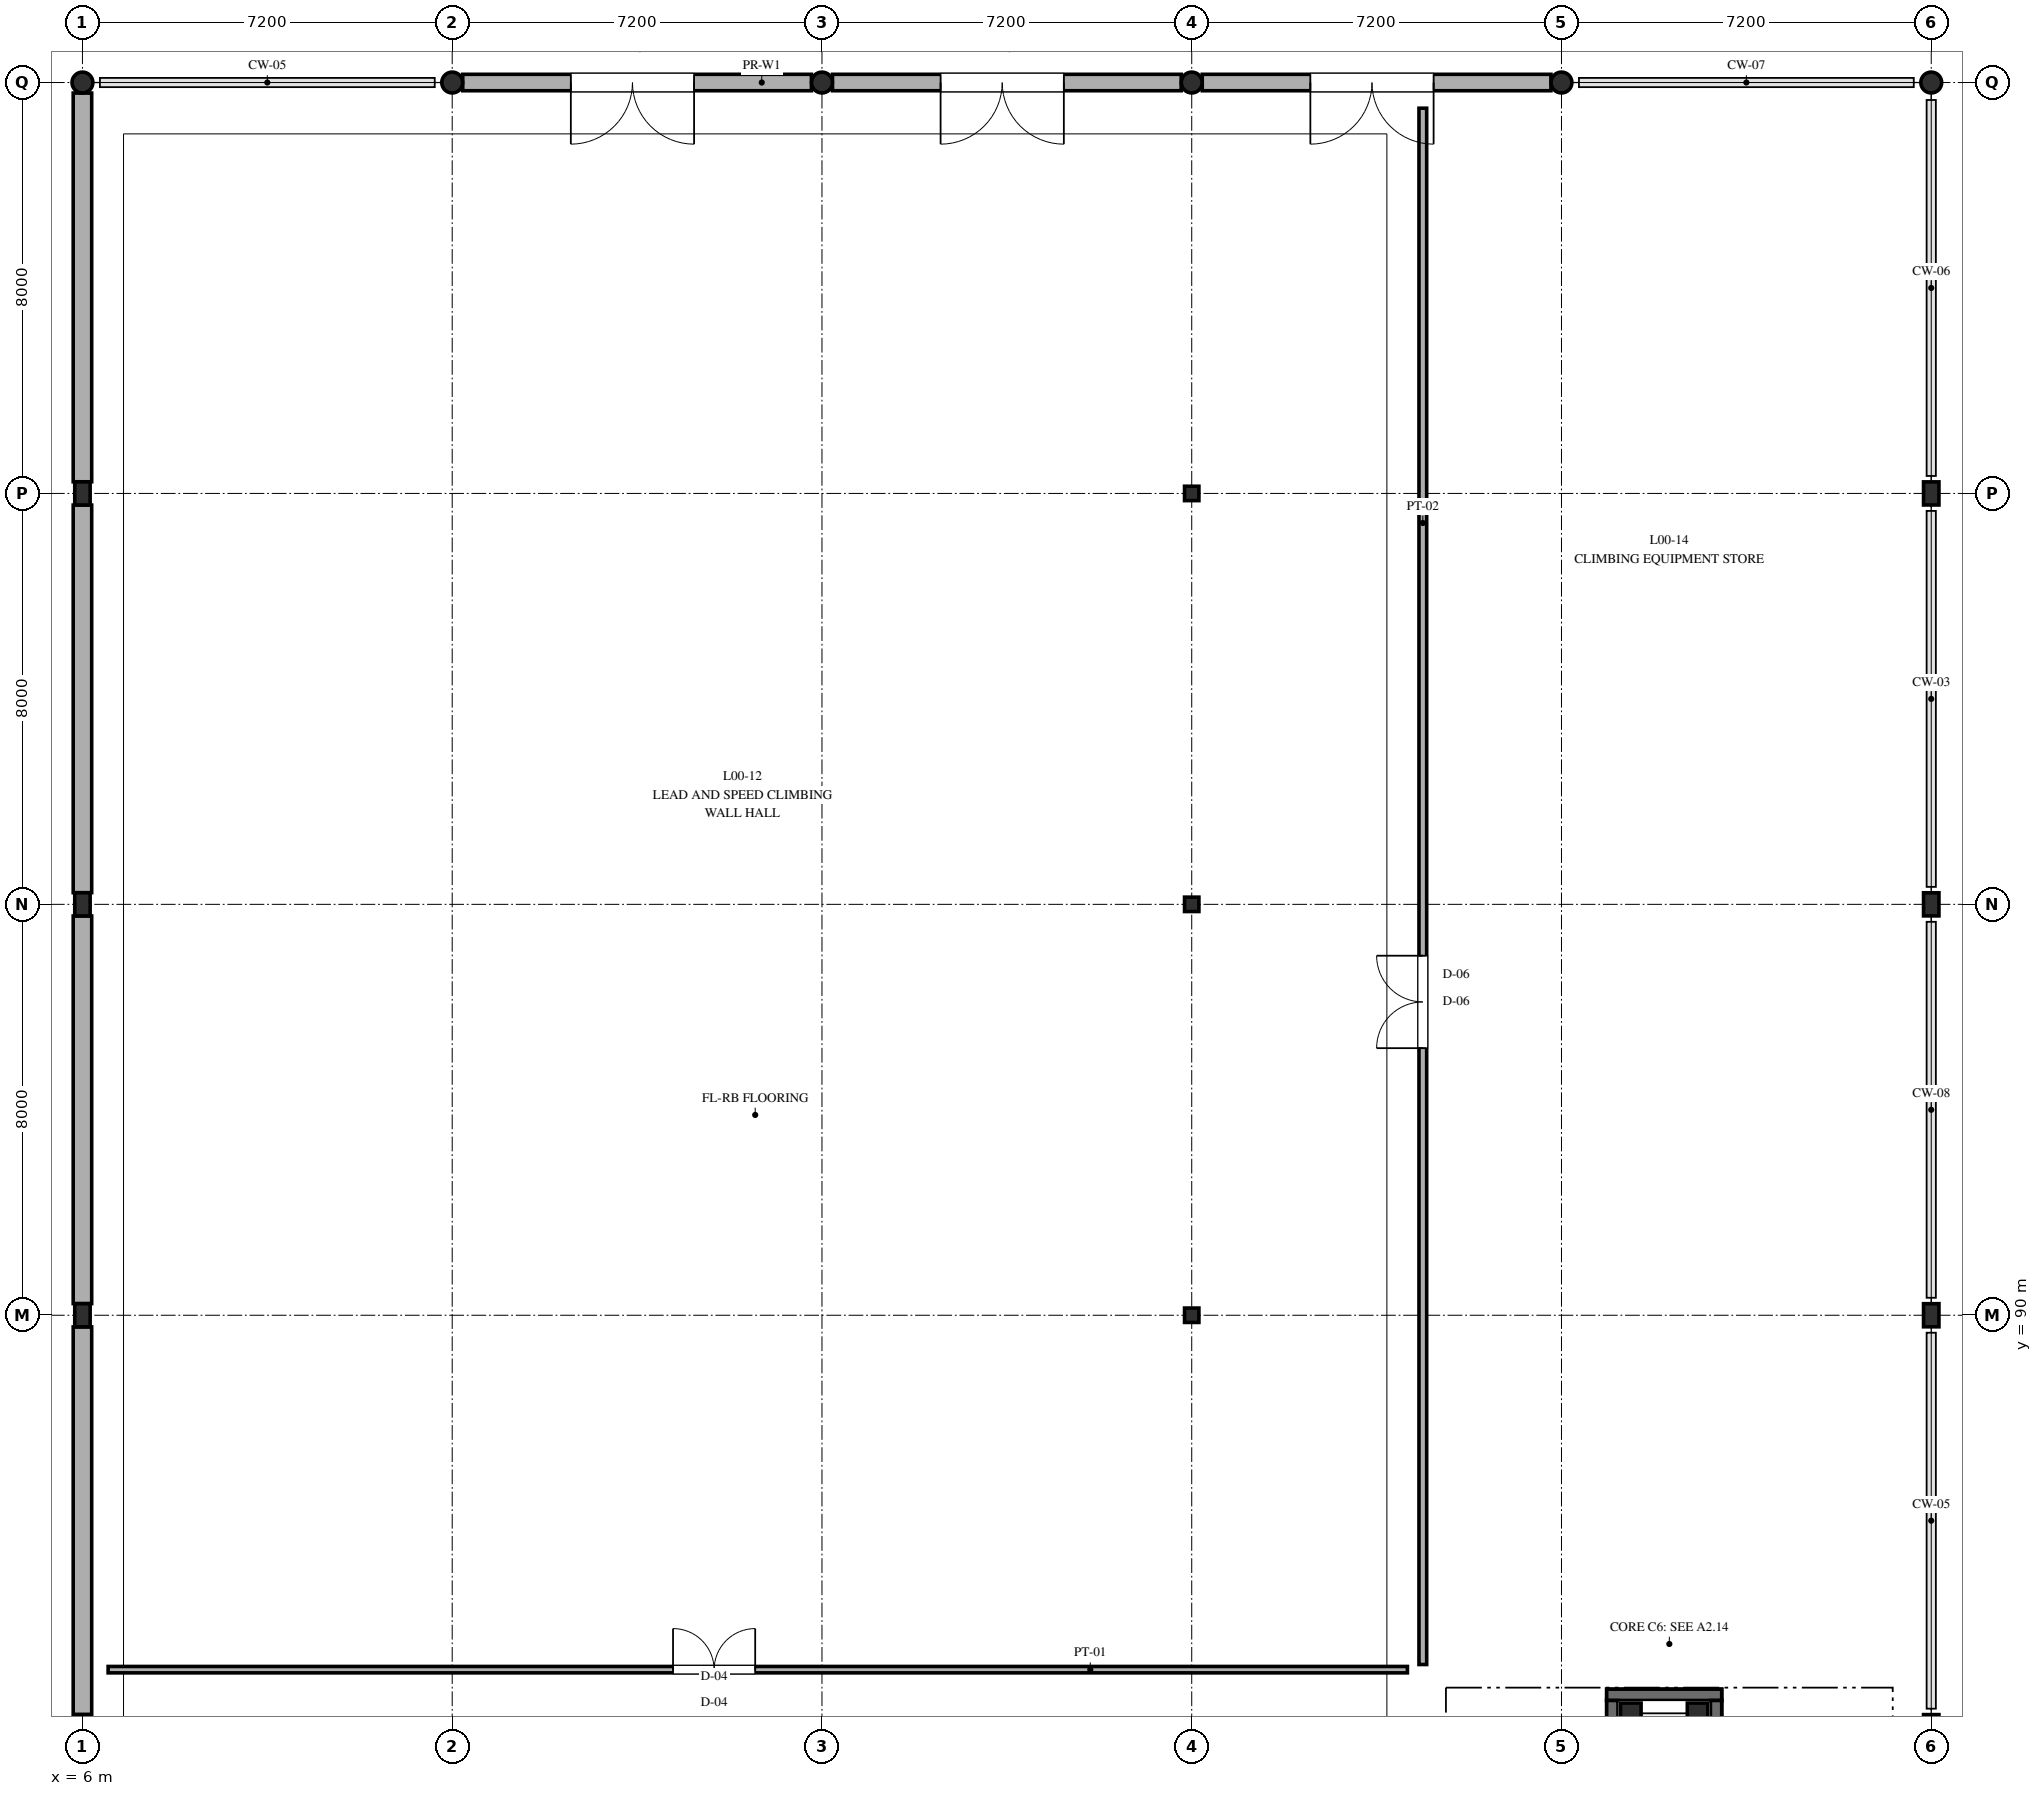
"""IFC4 building model, lengths in metres.
Left out: names, types, materials, properties, quantities, classifications, styles, units other than length and angle.
Written with IfcOpenShell. Run it as: python <this file> out.ifc"""

import sys

from ifc_helpers import new_model, si_unit, direction, frame, frame_2d, origin, origin_2d, place, context, subcontext, project, spatial, rectangle, hollow_circle, i_section, extrude, element, fill, save


model = new_model("IFC4")
c1 = context("Model", 3, precision=1e-05, world=origin(), true_north=direction((0.0, 1.0)))
c2 = subcontext(c1, "Body", "Model", "MODEL_VIEW")
j1 = project(units=[si_unit("LENGTHUNIT", "METRE"), si_unit("PLANEANGLEUNIT", "RADIAN")], contexts=[c1])
p1 = place(None, origin())
s1 = spatial("IfcSite", under=j1, at=p1, CompositionType="ELEMENT")
p2 = place(p1, origin())
s2 = spatial("IfcBuilding", under=s1, at=p2, CompositionType="ELEMENT")
p3 = place(p2, origin())
s3 = spatial("IfcBuildingStorey", under=s2, at=p3, CompositionType="ELEMENT", Elevation=0.0)
for number, where, z_axis, x_axis in (
    (1, (37.45, 82.25, -2.15), (0.0, 0.0, 1.0), (1.0, 0.0, 0.0)),
    (2, (36.15, 82.25, -2.15), (0.0, 0.0, 1.0), (1.0, 0.0, 0.0)),
):
    element("IfcColumn", number, at=place(p3, frame(where, z_axis=z_axis, x_axis=x_axis)), inside=s3, PredefinedType="COLUMN", context=c2, shape_type="SweptSolid", body=[
        extrude(rectangle(XDim=0.4, YDim=0.4, at=origin_2d()), origin(), (0.0, 0.0, 1.0), 0.5),
    ])
for number, where, z_axis, x_axis in (
    (3, (6.0, 114.0, 0.0), (0.0, 0.0, 1.0), (1.0, 0.0, 0.0)),
    (4, (13.2, 114.0, 0.0), (0.0, 0.0, 1.0), (1.0, 0.0, 0.0)),
    (5, (20.4, 114.0, 0.0), (0.0, 0.0, 1.0), (1.0, 0.0, 0.0)),
    (6, (27.6, 114.0, 0.0), (0.0, 0.0, 1.0), (1.0, 0.0, 0.0)),
    (7, (34.8, 114.0, 0.0), (0.0, 0.0, 1.0), (1.0, 0.0, 0.0)),
    (8, (42.0, 114.0, 0.0), (0.0, 0.0, 1.0), (1.0, 0.0, 0.0)),
):
    element("IfcColumn", number, at=place(p3, frame(where, z_axis=z_axis, x_axis=x_axis)), inside=s3, PredefinedType="COLUMN", context=c2, shape_type="SweptSolid", body=[
        extrude(hollow_circle(Radius=0.203, WallThickness=0.016, at=origin_2d()), origin(), (0.0, 0.0, 1.0), 4.8),
    ])
for number, where, z_axis, x_axis in (
    (9, (6.0, 82.0, 0.0), (0.0, 0.0, 1.0), (1.0, 0.0, 0.0)),
    (10, (42.0, 82.0, 0.0), (0.0, 0.0, 1.0), (1.0, 0.0, 0.0)),
    (11, (6.0, 90.0, 0.0), (0.0, 0.0, 1.0), (1.0, 0.0, 0.0)),
    (12, (42.0, 90.0, 0.0), (0.0, 0.0, 1.0), (1.0, 0.0, 0.0)),
):
    element("IfcColumn", number, at=place(p3, frame(where, z_axis=z_axis, x_axis=x_axis)), inside=s3, PredefinedType="COLUMN", context=c2, shape_type="SweptSolid", body=[
        extrude(i_section(OverallWidth=0.3, OverallDepth=0.45, WebThickness=0.014, FlangeThickness=0.026, FilletRadius=0.027, at=origin_2d()), origin(), (0.0, 0.0, 1.0), 4.8),
    ])
p4 = place(p3, frame((27.6, 90.0, 0.0), z_axis=(0.0, 0.0, 1.0), x_axis=(1.0, 0.0, 0.0)))
e13 = element("IfcColumn", 13, at=p4, inside=s3, PredefinedType="COLUMN", context=c2, shape_type="SweptSolid", body=[
    extrude(i_section(OverallWidth=0.28, OverallDepth=0.28, WebThickness=0.01, FlangeThickness=0.018, FilletRadius=0.024, at=origin_2d()), origin(), (0.0, 0.0, 1.0), 4.8),
])
for number, where, z_axis, x_axis in (
    (14, (6.0, 98.0, 0.0), (0.0, 0.0, 1.0), (1.0, 0.0, 0.0)),
    (15, (42.0, 98.0, 0.0), (0.0, 0.0, 1.0), (1.0, 0.0, 0.0)),
):
    element("IfcColumn", number, at=place(p3, frame(where, z_axis=z_axis, x_axis=x_axis)), inside=s3, PredefinedType="COLUMN", context=c2, shape_type="SweptSolid", body=[
        extrude(i_section(OverallWidth=0.3, OverallDepth=0.45, WebThickness=0.014, FlangeThickness=0.026, FilletRadius=0.027, at=origin_2d()), origin(), (0.0, 0.0, 1.0), 4.8),
    ])
p5 = place(p3, frame((27.6, 98.0, 0.0), z_axis=(0.0, 0.0, 1.0), x_axis=(1.0, 0.0, 0.0)))
e16 = element("IfcColumn", 16, at=p5, inside=s3, PredefinedType="COLUMN", context=c2, shape_type="SweptSolid", body=[
    extrude(i_section(OverallWidth=0.28, OverallDepth=0.28, WebThickness=0.01, FlangeThickness=0.018, FilletRadius=0.024, at=origin_2d()), origin(), (0.0, 0.0, 1.0), 4.8),
])
for number, where, z_axis, x_axis in (
    (17, (6.0, 106.0, 0.0), (0.0, 0.0, 1.0), (1.0, 0.0, 0.0)),
    (18, (42.0, 106.0, 0.0), (0.0, 0.0, 1.0), (1.0, 0.0, 0.0)),
):
    element("IfcColumn", number, at=place(p3, frame(where, z_axis=z_axis, x_axis=x_axis)), inside=s3, PredefinedType="COLUMN", context=c2, shape_type="SweptSolid", body=[
        extrude(i_section(OverallWidth=0.3, OverallDepth=0.45, WebThickness=0.014, FlangeThickness=0.026, FilletRadius=0.027, at=origin_2d()), origin(), (0.0, 0.0, 1.0), 4.8),
    ])
p6 = place(p3, frame((27.6, 106.0, 0.0), z_axis=(0.0, 0.0, 1.0), x_axis=(1.0, 0.0, 0.0)))
e19 = element("IfcColumn", 19, at=p6, inside=s3, PredefinedType="COLUMN", context=c2, shape_type="SweptSolid", body=[
    extrude(i_section(OverallWidth=0.28, OverallDepth=0.28, WebThickness=0.01, FlangeThickness=0.018, FilletRadius=0.024, at=origin_2d()), origin(), (0.0, 0.0, 1.0), 4.8),
])
p7 = place(p3, frame((20.195, 114.0, 0.0), z_axis=(0.0, 0.0, 1.0), x_axis=(-1.0, 0.0, 0.0)))
e20 = element("IfcWall", 20, at=p7, inside=s3, PredefinedType="STANDARD", context=c2, shape_type="SweptSolid", body=[
    extrude(rectangle(XDim=6.79, YDim=0.32, at=frame_2d((3.395, 0.0))), origin(), (0.0, 0.0, 1.0), 4.48),
])
p8 = place(p7, frame((2.285, 0.0, 0.0)))
e21 = element("IfcOpeningElement", 21, at=p8, cuts=e20, PredefinedType="OPENING", context=c2, shape_type="SweptSolid", body=[
    extrude(rectangle(XDim=2.4, YDim=2.4, at=frame_2d((1.2, 1.2))), frame((0.0, 0.17, 0.0), z_axis=(0.0, -1.0, 0.0), x_axis=(1.0, 0.0, 0.0)), (0.0, 0.0, 1.0), 0.34),
])
p9 = place(p3, frame((27.395, 114.0, 0.0), z_axis=(0.0, 0.0, 1.0), x_axis=(-1.0, 0.0, 0.0)))
e22 = element("IfcWall", 22, at=p9, inside=s3, PredefinedType="STANDARD", context=c2, shape_type="SweptSolid", body=[
    extrude(rectangle(XDim=6.79, YDim=0.32, at=frame_2d((3.395, 0.0))), origin(), (0.0, 0.0, 1.0), 4.26),
])
p10 = place(p9, frame((2.285, 0.0, 0.0)))
e23 = element("IfcOpeningElement", 23, at=p10, cuts=e22, PredefinedType="OPENING", context=c2, shape_type="SweptSolid", body=[
    extrude(rectangle(XDim=2.4, YDim=2.4, at=frame_2d((1.2, 1.2))), frame((0.0, 0.17, 0.0), z_axis=(0.0, -1.0, 0.0), x_axis=(1.0, 0.0, 0.0)), (0.0, 0.0, 1.0), 0.34),
])
p11 = place(p3, frame((34.595, 114.0, 0.0), z_axis=(0.0, 0.0, 1.0), x_axis=(-1.0, 0.0, 0.0)))
e24 = element("IfcWall", 24, at=p11, inside=s3, PredefinedType="STANDARD", context=c2, shape_type="SweptSolid", body=[
    extrude(rectangle(XDim=6.79, YDim=0.32, at=frame_2d((3.395, 0.0))), origin(), (0.0, 0.0, 1.0), 4.26),
])
p12 = place(p11, frame((2.285, 0.0, 0.0)))
e25 = element("IfcOpeningElement", 25, at=p12, cuts=e24, PredefinedType="OPENING", context=c2, shape_type="SweptSolid", body=[
    extrude(rectangle(XDim=2.4, YDim=2.4, at=frame_2d((1.2, 1.2))), frame((0.0, 0.17, 0.0), z_axis=(0.0, -1.0, 0.0), x_axis=(1.0, 0.0, 0.0)), (0.0, 0.0, 1.0), 0.34),
])
for number, where, z_axis, x_axis in (
    (26, (6.0, 89.773, 0.0), (0.0, 0.0, 1.0), (0.0, -1.0, 0.0)),
    (27, (6.0, 97.773, 0.0), (0.0, 0.0, 1.0), (0.0, -1.0, 0.0)),
    (28, (6.0, 105.773, 0.0), (0.0, 0.0, 1.0), (0.0, -1.0, 0.0)),
):
    element("IfcWall", number, at=place(p3, frame(where, z_axis=z_axis, x_axis=x_axis)), inside=s3, PredefinedType="STANDARD", context=c2, shape_type="SweptSolid", body=[
        extrude(rectangle(XDim=7.546, YDim=0.36, at=frame_2d((3.773, 0.0))), origin(), (0.0, 0.0, 1.0), 4.8),
    ])
p13 = place(p3, frame((6.0, 113.795, 0.0), z_axis=(0.0, 0.0, 1.0), x_axis=(0.0, -1.0, 0.0)))
e29 = element("IfcWall", 29, at=p13, inside=s3, PredefinedType="STANDARD", context=c2, shape_type="SweptSolid", body=[
    extrude(rectangle(XDim=7.568, YDim=0.36, at=frame_2d((3.784, 0.0))), origin(), (0.0, 0.0, 1.0), 4.8),
])
p14 = place(p3, frame((37.92, 82.61, -2.15), z_axis=(0.0, 0.0, 1.0), x_axis=(-1.0, 0.0, 0.0)))
e30 = element("IfcWall", 30, at=p14, inside=s3, PredefinedType="SHEAR", context=c2, shape_type="SweptSolid", body=[
    extrude(rectangle(XDim=2.24, YDim=0.22, at=frame_2d((1.12, 0.0))), origin(), (0.0, 0.0, 1.0), 2.15),
])
for number, where, z_axis, x_axis in (
    (31, (35.79, 82.5, -2.15), (0.0, 0.0, 1.0), (0.0, -1.0, 0.0)),
    (32, (37.81, 79.9, -2.15), (0.0, 0.0, 1.0), (0.0, 1.0, 0.0)),
):
    element("IfcWall", number, at=place(p3, frame(where, z_axis=z_axis, x_axis=x_axis)), inside=s3, PredefinedType="SHEAR", context=c2, shape_type="SweptSolid", body=[
        extrude(rectangle(XDim=2.6, YDim=0.22, at=frame_2d((1.3, 0.0))), origin(), (0.0, 0.0, 1.0), 2.15),
    ])
p15 = place(p3, frame((37.92, 82.61, 0.0), z_axis=(0.0, 0.0, 1.0), x_axis=(-1.0, 0.0, 0.0)))
e33 = element("IfcWall", 33, at=p15, inside=s3, PredefinedType="SHEAR", context=c2, shape_type="SweptSolid", body=[
    extrude(rectangle(XDim=2.24, YDim=0.22, at=frame_2d((1.12, 0.0))), origin(), (0.0, 0.0, 1.0), 4.8),
])
p16 = place(p3, frame((35.79, 82.5, 0.0), z_axis=(0.0, 0.0, 1.0), x_axis=(0.0, -1.0, 0.0)))
e34 = element("IfcWall", 34, at=p16, inside=s3, PredefinedType="SHEAR", context=c2, shape_type="SweptSolid", body=[
    extrude(rectangle(XDim=2.6, YDim=0.22, at=frame_2d((1.3, 0.0))), origin(), (0.0, 0.0, 1.0), 4.8),
])
p17 = place(p16, frame((0.85, 0.0, 0.0)))
e35 = element("IfcOpeningElement", 35, at=p17, cuts=e34, PredefinedType="OPENING", context=c2, shape_type="SweptSolid", body=[
    extrude(rectangle(XDim=0.9, YDim=2.15, at=frame_2d((0.45, 1.075))), frame((0.0, 0.12, 0.0), z_axis=(0.0, -1.0, 0.0), x_axis=(1.0, 0.0, 0.0)), (0.0, 0.0, 1.0), 0.24),
])
p18 = place(p3, frame((37.81, 79.9, 0.0), z_axis=(0.0, 0.0, 1.0), x_axis=(0.0, 1.0, 0.0)))
e36 = element("IfcWall", 36, at=p18, inside=s3, PredefinedType="SHEAR", context=c2, shape_type="SweptSolid", body=[
    extrude(rectangle(XDim=2.6, YDim=0.22, at=frame_2d((1.3, 0.0))), origin(), (0.0, 0.0, 1.0), 4.8),
])
p19 = place(p3, frame((6.5, 83.1, 0.0), z_axis=(0.0, 0.0, 1.0), x_axis=(1.0, 0.0, 0.0)))
e37 = element("IfcWall", 37, at=p19, inside=s3, PredefinedType="PARTITIONING", context=c2, shape_type="SweptSolid", body=[
    extrude(rectangle(XDim=25.3, YDim=0.125, at=frame_2d((12.65, 0.0))), origin(), (0.0, 0.0, 1.0), 4.1),
])
p20 = place(p19, frame((11.0, 0.0, 0.0)))
e38 = element("IfcOpeningElement", 38, at=p20, cuts=e37, PredefinedType="OPENING", context=c2, shape_type="SweptSolid", body=[
    extrude(rectangle(XDim=1.6, YDim=2.2, at=frame_2d((0.8, 1.1))), frame((0.0, 0.073, 0.0), z_axis=(0.0, -1.0, 0.0), x_axis=(1.0, 0.0, 0.0)), (0.0, 0.0, 1.0), 0.145),
])
p21 = place(p3, frame((32.1, 83.2, 0.0), z_axis=(0.0, 0.0, 1.0), x_axis=(0.0, 1.0, 0.0)))
e39 = element("IfcWall", 39, at=p21, inside=s3, PredefinedType="PARTITIONING", context=c2, shape_type="SweptSolid", body=[
    extrude(rectangle(XDim=30.3, YDim=0.15, at=frame_2d((15.15, 0.0))), origin(), (0.0, 0.0, 1.0), 4.1),
])
p22 = place(p21, frame((12.0, 0.0, 0.0)))
e40 = element("IfcOpeningElement", 40, at=p22, cuts=e39, PredefinedType="OPENING", context=c2, shape_type="SweptSolid", body=[
    extrude(rectangle(XDim=1.8, YDim=2.25, at=frame_2d((0.9, 1.125))), frame((0.0, 0.085, 0.0), z_axis=(0.0, -1.0, 0.0), x_axis=(1.0, 0.0, 0.0)), (0.0, 0.0, 1.0), 0.17),
])
p23 = place(p8, origin())
e41 = element("IfcDoor", 41, at=p23, inside=s3, OperationType="DOUBLE_DOOR_SINGLE_SWING", PredefinedType="DOOR", context=c2, shape_type="SweptSolid", body=[
    extrude(rectangle(XDim=2.4, YDim=2.4, at=frame_2d((1.2, 1.2))), frame((0.0, 0.025, 0.0), z_axis=(0.0, -1.0, 0.0), x_axis=(1.0, 0.0, 0.0)), (0.0, 0.0, 1.0), 0.05),
])
fill(e21, e41)
p24 = place(p10, origin())
e42 = element("IfcDoor", 42, at=p24, inside=s3, OperationType="DOUBLE_DOOR_SINGLE_SWING", PredefinedType="DOOR", context=c2, shape_type="SweptSolid", body=[
    extrude(rectangle(XDim=2.4, YDim=2.4, at=frame_2d((1.2, 1.2))), frame((0.0, 0.025, 0.0), z_axis=(0.0, -1.0, 0.0), x_axis=(1.0, 0.0, 0.0)), (0.0, 0.0, 1.0), 0.05),
])
fill(e23, e42)
p25 = place(p12, origin())
e43 = element("IfcDoor", 43, at=p25, inside=s3, OperationType="DOUBLE_DOOR_SINGLE_SWING", PredefinedType="DOOR", context=c2, shape_type="SweptSolid", body=[
    extrude(rectangle(XDim=2.4, YDim=2.4, at=frame_2d((1.2, 1.2))), frame((0.0, 0.025, 0.0), z_axis=(0.0, -1.0, 0.0), x_axis=(1.0, 0.0, 0.0)), (0.0, 0.0, 1.0), 0.05),
])
fill(e25, e43)
p26 = place(p20, origin())
e44 = element("IfcDoor", 44, at=p26, inside=s3, OperationType="DOUBLE_DOOR_SINGLE_SWING", PredefinedType="DOOR", context=c2, shape_type="SweptSolid", body=[
    extrude(rectangle(XDim=1.6, YDim=2.2, at=frame_2d((0.8, 1.1))), frame((0.0, 0.025, 0.0), z_axis=(0.0, -1.0, 0.0), x_axis=(1.0, 0.0, 0.0)), (0.0, 0.0, 1.0), 0.05),
])
fill(e38, e44)
p27 = place(p22, origin())
e45 = element("IfcDoor", 45, at=p27, inside=s3, OperationType="DOUBLE_DOOR_SINGLE_SWING", PredefinedType="DOOR", context=c2, shape_type="SweptSolid", body=[
    extrude(rectangle(XDim=1.8, YDim=2.25, at=frame_2d((0.9, 1.125))), frame((0.0, 0.025, 0.0), z_axis=(0.0, -1.0, 0.0), x_axis=(1.0, 0.0, 0.0)), (0.0, 0.0, 1.0), 0.05),
])
fill(e40, e45)
save(model, sys.argv[1])
